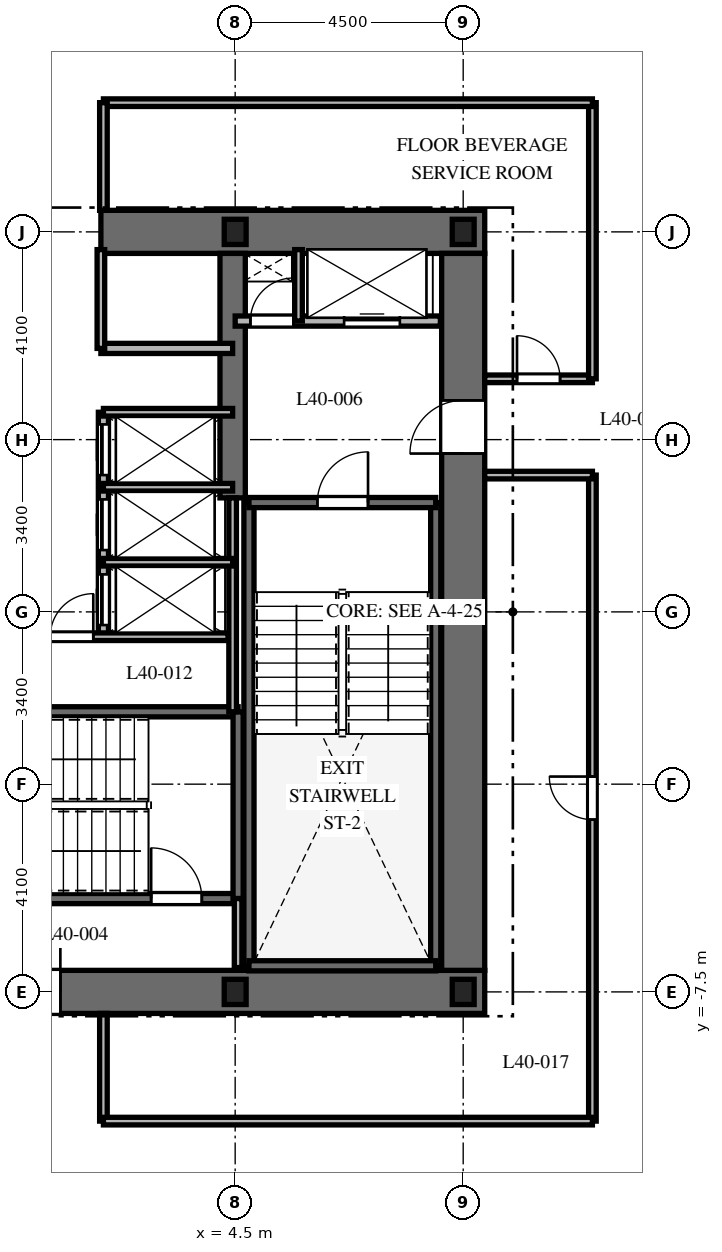
"""IFC4 building model, lengths in metres.
Left out: names, types, materials, properties, quantities, classifications, styles, units other than length and angle.
Written with IfcOpenShell. Run it as: python <this file> out.ifc"""

import sys

from ifc_helpers import new_model, si_unit, direction, frame, frame_2d, origin, origin_2d, place, context, subcontext, project, spatial, rectangle, i_section, extrude, element, fill, save


model = new_model("IFC4")
c1 = context("Model", 3, precision=1e-05, world=origin(), true_north=direction((0.0, 1.0)))
c2 = subcontext(c1, "Body", "Model", "MODEL_VIEW")
j1 = project(units=[si_unit("LENGTHUNIT", "METRE"), si_unit("PLANEANGLEUNIT", "RADIAN")], contexts=[c1])
p1 = place(None, origin())
s1 = spatial("IfcSite", under=j1, at=p1, CompositionType="ELEMENT")
p2 = place(p1, origin())
s2 = spatial("IfcBuilding", under=s1, at=p2, CompositionType="ELEMENT")
p3 = place(p2, frame((0.0, 0.0, 162.8)))
s3 = spatial("IfcBuildingStorey", under=s2, at=p3, CompositionType="ELEMENT", Elevation=162.8)
p4 = place(p3, frame((-9.425, -7.5, 0.0), z_axis=(0.0, 0.0, 1.0), x_axis=(1.0, 0.0, 0.0)))
e1 = element("IfcWall", 1, at=p4, inside=s3, PredefinedType="SHEAR", context=c2, shape_type="SweptSolid", body=[
    extrude(rectangle(XDim=18.85, YDim=0.85, at=frame_2d((9.425, 0.0))), origin(), (0.0, 0.0, 1.0), 3.7),
])
p5 = place(p4, frame((9.475, 0.0, 0.0)))
e2 = element("IfcOpeningElement", 2, at=p5, cuts=e1, PredefinedType="OPENING", context=c2, shape_type="SweptSolid", body=[
    extrude(rectangle(XDim=1.0, YDim=2.15, at=frame_2d((0.5, 1.075))), frame((0.0, 0.435, 0.0), z_axis=(0.0, -1.0, 0.0), x_axis=(1.0, 0.0, 0.0)), (0.0, 0.0, 1.0), 0.87),
])
p6 = place(p3, frame((1.85, 7.5, 0.0), z_axis=(0.0, 0.0, 1.0), x_axis=(1.0, 0.0, 0.0)))
e3 = element("IfcWall", 3, at=p6, inside=s3, PredefinedType="SHEAR", context=c2, shape_type="SweptSolid", body=[
    extrude(rectangle(XDim=7.575, YDim=0.85, at=frame_2d((3.788, 0.0))), origin(), (0.0, 0.0, 1.0), 3.7),
])
p7 = place(p3, frame((9.0, -7.075, 0.0), z_axis=(0.0, 0.0, 1.0), x_axis=(0.0, 1.0, 0.0)))
e4 = element("IfcWall", 4, at=p7, inside=s3, PredefinedType="SHEAR", context=c2, shape_type="SweptSolid", body=[
    extrude(rectangle(XDim=14.15, YDim=0.85, at=frame_2d((7.075, 0.0))), origin(), (0.0, 0.0, 1.0), 3.7),
])
p8 = place(p7, frame((10.2, 0.0, 0.0)))
e5 = element("IfcOpeningElement", 5, at=p8, cuts=e4, PredefinedType="OPENING", context=c2, shape_type="SweptSolid", body=[
    extrude(rectangle(XDim=1.05, YDim=2.15, at=frame_2d((0.525, 1.075))), frame((0.0, 0.435, 0.0), z_axis=(0.0, -1.0, 0.0), x_axis=(1.0, 0.0, 0.0)), (0.0, 0.0, 1.0), 0.87),
])
p9 = place(p3, frame((4.45, 2.25, 0.0), z_axis=(0.0, 0.0, 1.0), x_axis=(0.0, 1.0, 0.0)))
e6 = element("IfcWall", 6, at=p9, inside=s3, PredefinedType="SHEAR", context=c2, shape_type="SweptSolid", body=[
    extrude(rectangle(XDim=4.825, YDim=0.5, at=frame_2d((2.413, 0.0))), origin(), (0.0, 0.0, 1.0), 3.7),
])
for number, where, z_axis, x_axis in (
    (7, (4.772, -6.985, 0.0), (0.0, 0.0, 1.0), (0.0, 1.0, 0.0)),
    (8, (8.458, -6.985, 0.0), (0.0, 0.0, 1.0), (0.0, 1.0, 0.0)),
):
    element("IfcWall", number, at=place(p3, frame(where, z_axis=z_axis, x_axis=x_axis)), inside=s3, PredefinedType="SHEAR", context=c2, shape_type="SweptSolid", body=[
        extrude(rectangle(XDim=9.143, YDim=0.2, at=frame_2d((4.572, 0.0))), origin(), (0.0, 0.0, 1.0), 3.7),
    ])
p10 = place(p3, frame((4.772, -6.985, 0.0), z_axis=(0.0, 0.0, 1.0), x_axis=(1.0, 0.0, 0.0)))
e9 = element("IfcWall", 9, at=p10, inside=s3, PredefinedType="SHEAR", context=c2, shape_type="SweptSolid", body=[
    extrude(rectangle(XDim=3.686, YDim=0.2, at=frame_2d((1.843, 0.0))), origin(), (0.0, 0.0, 1.0), 3.7),
])
p11 = place(p3, frame((4.772, 2.158, 0.0), z_axis=(0.0, 0.0, 1.0), x_axis=(1.0, 0.0, 0.0)))
e10 = element("IfcWall", 10, at=p11, inside=s3, PredefinedType="SHEAR", context=c2, shape_type="SweptSolid", body=[
    extrude(rectangle(XDim=3.686, YDim=0.2, at=frame_2d((1.843, 0.0))), origin(), (0.0, 0.0, 1.0), 3.7),
])
p12 = place(p11, frame((1.35, 0.0, 0.0)))
e11 = element("IfcOpeningElement", 11, at=p12, cuts=e10, PredefinedType="OPENING", context=c2, shape_type="SweptSolid", body=[
    extrude(rectangle(XDim=1.0, YDim=2.15, at=frame_2d((0.5, 1.075))), frame((0.0, 0.11, 0.0), z_axis=(0.0, -1.0, 0.0), x_axis=(1.0, 0.0, 0.0)), (0.0, 0.0, 1.0), 0.22),
])
p13 = place(p3, frame((-4.608, -5.658, 0.0), z_axis=(0.0, 0.0, 1.0), x_axis=(1.0, 0.0, 0.0)))
e12 = element("IfcWall", 12, at=p13, inside=s3, PredefinedType="SHEAR", context=c2, shape_type="SweptSolid", body=[
    extrude(rectangle(XDim=9.166, YDim=0.2, at=frame_2d((4.583, 0.0))), origin(), (0.0, 0.0, 1.0), 3.7),
])
p14 = place(p13, frame((7.45, 0.0, 0.0)))
e13 = element("IfcOpeningElement", 13, at=p14, cuts=e12, PredefinedType="OPENING", context=c2, shape_type="SweptSolid", body=[
    extrude(rectangle(XDim=1.0, YDim=2.15, at=frame_2d((0.5, 1.075))), frame((0.0, 0.11, 0.0), z_axis=(0.0, -1.0, 0.0), x_axis=(1.0, 0.0, 0.0)), (0.0, 0.0, 1.0), 0.22),
])
p15 = place(p3, frame((-4.608, -1.972, 0.0), z_axis=(0.0, 0.0, 1.0), x_axis=(1.0, 0.0, 0.0)))
e14 = element("IfcWall", 14, at=p15, inside=s3, PredefinedType="SHEAR", context=c2, shape_type="SweptSolid", body=[
    extrude(rectangle(XDim=9.166, YDim=0.2, at=frame_2d((4.583, 0.0))), origin(), (0.0, 0.0, 1.0), 3.7),
])
p16 = place(p3, frame((4.558, -5.658, 0.0), z_axis=(0.0, 0.0, 1.0), x_axis=(0.0, 1.0, 0.0)))
e15 = element("IfcWall", 15, at=p16, inside=s3, PredefinedType="SHEAR", context=c2, shape_type="SweptSolid", body=[
    extrude(rectangle(XDim=3.686, YDim=0.2, at=frame_2d((1.843, 0.0))), origin(), (0.0, 0.0, 1.0), 3.7),
])
for number, where, z_axis, x_axis in (
    (16, (4.5, -7.5, 0.0), (0.0, 0.0, 1.0), (1.0, 0.0, 0.0)),
    (17, (9.0, -7.5, 0.0), (0.0, 0.0, 1.0), (1.0, 0.0, 0.0)),
    (18, (9.0, 7.5, 0.0), (0.0, 0.0, 1.0), (1.0, 0.0, 0.0)),
    (19, (4.5, 7.5, 0.0), (0.0, 0.0, 1.0), (1.0, 0.0, 0.0)),
):
    element("IfcColumn", number, at=place(p3, frame(where, z_axis=z_axis, x_axis=x_axis)), inside=s3, PredefinedType="COLUMN", context=c2, shape_type="SweptSolid", body=[
        extrude(i_section(OverallWidth=0.432, OverallDepth=0.498, WebThickness=0.056, FlangeThickness=0.089, at=origin_2d()), origin(), (0.0, 0.0, 1.0), 3.7),
    ])
p17 = place(p3, frame((4.558, -7.02, 0.0), z_axis=(0.0, 0.0, 1.0), x_axis=(0.0, 1.0, 0.0)))
e20 = element("IfcWall", 20, at=p17, inside=s3, PredefinedType="PARTITIONING", context=c2, shape_type="SweptSolid", body=[
    extrude(rectangle(XDim=1.362, YDim=0.15, at=frame_2d((0.681, 0.0))), origin(), (0.0, 0.0, 1.0), 3.4),
])
p18 = place(p3, frame((4.5, 5.74, 0.0), z_axis=(0.0, 0.0, 1.0), x_axis=(1.0, 0.0, 0.0)))
e21 = element("IfcWall", 21, at=p18, inside=s3, PredefinedType="PARTITIONING", context=c2, shape_type="SweptSolid", body=[
    extrude(rectangle(XDim=4.05, YDim=0.2, at=frame_2d((2.025, 0.0))), origin(), (0.0, 0.0, 1.0), 3.4),
])
p19 = place(p18, frame((0.3, 0.0, 0.0)))
e22 = element("IfcOpeningElement", 22, at=p19, cuts=e21, PredefinedType="OPENING", context=c2, shape_type="SweptSolid", body=[
    extrude(rectangle(XDim=0.85, YDim=2.03, at=frame_2d((0.425, 1.015))), frame((0.0, 0.11, 0.0), z_axis=(0.0, -1.0, 0.0), x_axis=(1.0, 0.0, 0.0)), (0.0, 0.0, 1.0), 0.22),
])
p20 = place(p18, frame((2.15, 0.0, 0.0)))
e23 = element("IfcOpeningElement", 23, at=p20, cuts=e21, PredefinedType="OPENING", context=c2, shape_type="SweptSolid", body=[
    extrude(rectangle(XDim=1.1, YDim=2.2, at=frame_2d((0.55, 1.1))), frame((0.0, 0.11, 0.0), z_axis=(0.0, -1.0, 0.0), x_axis=(1.0, 0.0, 0.0)), (0.0, 0.0, 1.0), 0.22),
])
p21 = place(p3, frame((5.75, 5.74, 0.0), z_axis=(0.0, 0.0, 1.0), x_axis=(0.0, 1.0, 0.0)))
e24 = element("IfcWall", 24, at=p21, inside=s3, PredefinedType="PARTITIONING", context=c2, shape_type="SweptSolid", body=[
    extrude(rectangle(XDim=1.41, YDim=0.15, at=frame_2d((0.705, 0.0))), origin(), (0.0, 0.0, 1.0), 3.4),
])
p22 = place(p3, frame((1.85, 5.2, 0.0), z_axis=(0.0, 0.0, 1.0), x_axis=(1.0, 0.0, 0.0)))
e25 = element("IfcWall", 25, at=p22, inside=s3, PredefinedType="PARTITIONING", context=c2, shape_type="SweptSolid", body=[
    extrude(rectangle(XDim=2.6, YDim=0.2, at=frame_2d((1.3, 0.0))), origin(), (0.0, 0.0, 1.0), 3.4),
])
p23 = place(p3, frame((1.85, 5.2, 0.0), z_axis=(0.0, 0.0, 1.0), x_axis=(0.0, 1.0, 0.0)))
e26 = element("IfcWall", 26, at=p23, inside=s3, PredefinedType="PARTITIONING", context=c2, shape_type="SweptSolid", body=[
    extrude(rectangle(XDim=1.95, YDim=0.15, at=frame_2d((0.975, 0.0))), origin(), (0.0, 0.0, 1.0), 3.4),
])
p24 = place(p3, frame((4.45, -1.972, 0.0), z_axis=(0.0, 0.0, 1.0), x_axis=(0.0, 1.0, 0.0)))
e27 = element("IfcWall", 27, at=p24, inside=s3, PredefinedType="PARTITIONING", context=c2, shape_type="SweptSolid", body=[
    extrude(rectangle(XDim=4.222, YDim=0.15, at=frame_2d((2.111, 0.0))), origin(), (0.0, 0.0, 1.0), 3.4),
])
p25 = place(p3, frame((1.9, -0.5, 0.0), z_axis=(0.0, 0.0, 1.0), x_axis=(0.0, 1.0, 0.0)))
e28 = element("IfcWall", 28, at=p25, inside=s3, PredefinedType="PARTITIONING", context=c2, shape_type="SweptSolid", body=[
    extrude(rectangle(XDim=4.44, YDim=0.2, at=frame_2d((2.22, 0.0))), origin(), (0.0, 0.0, 1.0), 3.4),
])
p26 = place(p25, frame((0.24, 0.0, 0.0)))
e29 = element("IfcOpeningElement", 29, at=p26, cuts=e28, PredefinedType="OPENING", context=c2, shape_type="SweptSolid", body=[
    extrude(rectangle(XDim=1.0, YDim=2.2, at=frame_2d((0.5, 1.1))), frame((0.0, 0.11, 0.0), z_axis=(0.0, -1.0, 0.0), x_axis=(1.0, 0.0, 0.0)), (0.0, 0.0, 1.0), 0.22),
])
p27 = place(p25, frame((1.72, 0.0, 0.0)))
e30 = element("IfcOpeningElement", 30, at=p27, cuts=e28, PredefinedType="OPENING", context=c2, shape_type="SweptSolid", body=[
    extrude(rectangle(XDim=1.0, YDim=2.2, at=frame_2d((0.5, 1.1))), frame((0.0, 0.11, 0.0), z_axis=(0.0, -1.0, 0.0), x_axis=(1.0, 0.0, 0.0)), (0.0, 0.0, 1.0), 0.22),
])
p28 = place(p25, frame((3.2, 0.0, 0.0)))
e31 = element("IfcOpeningElement", 31, at=p28, cuts=e28, PredefinedType="OPENING", context=c2, shape_type="SweptSolid", body=[
    extrude(rectangle(XDim=1.0, YDim=2.2, at=frame_2d((0.5, 1.1))), frame((0.0, 0.11, 0.0), z_axis=(0.0, -1.0, 0.0), x_axis=(1.0, 0.0, 0.0)), (0.0, 0.0, 1.0), 0.22),
])
for number, where, z_axis, x_axis in (
    (32, (1.9, 3.94, 0.0), (0.0, 0.0, 1.0), (1.0, 0.0, 0.0)),
    (33, (1.9, 0.98, 0.0), (0.0, 0.0, 1.0), (1.0, 0.0, 0.0)),
    (34, (1.9, 2.46, 0.0), (0.0, 0.0, 1.0), (1.0, 0.0, 0.0)),
):
    element("IfcWall", number, at=place(p3, frame(where, z_axis=z_axis, x_axis=x_axis)), inside=s3, PredefinedType="PARTITIONING", context=c2, shape_type="SweptSolid", body=[
        extrude(rectangle(XDim=2.55, YDim=0.15, at=frame_2d((1.275, 0.0))), origin(), (0.0, 0.0, 1.0), 3.4),
    ])
p29 = place(p3, frame((-4.36, -0.49, 0.0), z_axis=(0.0, 0.0, 1.0), x_axis=(1.0, 0.0, 0.0)))
e35 = element("IfcWall", 35, at=p29, inside=s3, PredefinedType="PARTITIONING", context=c2, shape_type="SweptSolid", body=[
    extrude(rectangle(XDim=8.72, YDim=0.15, at=frame_2d((4.36, 0.0))), origin(), (0.0, 0.0, 1.0), 3.4),
])
p30 = place(p29, frame((3.16, 0.0, 0.0)))
e36 = element("IfcOpeningElement", 36, at=p30, cuts=e35, PredefinedType="OPENING", context=c2, shape_type="SweptSolid", body=[
    extrude(rectangle(XDim=0.85, YDim=2.03, at=frame_2d((0.425, 1.015))), frame((0.0, 0.085, 0.0), z_axis=(0.0, -1.0, 0.0), x_axis=(1.0, 0.0, 0.0)), (0.0, 0.0, 1.0), 0.17),
])
p31 = place(p29, frame((5.21, 0.0, 0.0)))
e37 = element("IfcOpeningElement", 37, at=p31, cuts=e35, PredefinedType="OPENING", context=c2, shape_type="SweptSolid", body=[
    extrude(rectangle(XDim=0.85, YDim=2.03, at=frame_2d((0.425, 1.015))), frame((0.0, 0.085, 0.0), z_axis=(0.0, -1.0, 0.0), x_axis=(1.0, 0.0, 0.0)), (0.0, 0.0, 1.0), 0.17),
])
p32 = place(p3, frame((11.55, -10.05, 0.0), z_axis=(0.0, 0.0, 1.0), x_axis=(0.0, 1.0, 0.0)))
e38 = element("IfcWall", 38, at=p32, inside=s3, PredefinedType="PARTITIONING", context=c2, shape_type="SweptSolid", body=[
    extrude(rectangle(XDim=12.75, YDim=0.15, at=frame_2d((6.375, 0.0))), origin(), (0.0, 0.0, 1.0), 2.84),
])
p33 = place(p32, frame((5.95, 0.0, 0.0)))
e39 = element("IfcOpeningElement", 39, at=p33, cuts=e38, PredefinedType="OPENING", context=c2, shape_type="SweptSolid", body=[
    extrude(rectangle(XDim=0.85, YDim=2.03, at=frame_2d((0.425, 1.015))), frame((0.0, 0.085, 0.0), z_axis=(0.0, -1.0, 0.0), x_axis=(1.0, 0.0, 0.0)), (0.0, 0.0, 1.0), 0.17),
])
p34 = place(p3, frame((11.55, 2.7, 0.0), z_axis=(0.0, 0.0, 1.0), x_axis=(-1.0, 0.0, 0.0)))
e40 = element("IfcWall", 40, at=p34, inside=s3, PredefinedType="PARTITIONING", context=c2, shape_type="SweptSolid", body=[
    extrude(rectangle(XDim=2.125, YDim=0.15, at=frame_2d((1.062, 0.0))), origin(), (0.0, 0.0, 1.0), 3.4),
])
p35 = place(p3, frame((9.425, 4.6, 0.0), z_axis=(0.0, 0.0, 1.0), x_axis=(1.0, 0.0, 0.0)))
e41 = element("IfcWall", 41, at=p35, inside=s3, PredefinedType="PARTITIONING", context=c2, shape_type="SweptSolid", body=[
    extrude(rectangle(XDim=2.125, YDim=0.15, at=frame_2d((1.062, 0.0))), origin(), (0.0, 0.0, 1.0), 3.4),
])
p36 = place(p35, frame((0.637, 0.0, 0.0)))
e42 = element("IfcOpeningElement", 42, at=p36, cuts=e41, PredefinedType="OPENING", context=c2, shape_type="SweptSolid", body=[
    extrude(rectangle(XDim=0.85, YDim=2.03, at=frame_2d((0.425, 1.015))), frame((0.0, 0.085, 0.0), z_axis=(0.0, -1.0, 0.0), x_axis=(1.0, 0.0, 0.0)), (0.0, 0.0, 1.0), 0.17),
])
p37 = place(p3, frame((11.55, 4.6, 0.0), z_axis=(0.0, 0.0, 1.0), x_axis=(0.0, 1.0, 0.0)))
e43 = element("IfcWall", 43, at=p37, inside=s3, PredefinedType="PARTITIONING", context=c2, shape_type="SweptSolid", body=[
    extrude(rectangle(XDim=5.45, YDim=0.15, at=frame_2d((2.725, 0.0))), origin(), (0.0, 0.0, 1.0), 2.84),
])
p38 = place(p3, frame((11.55, 10.05, 0.0), z_axis=(0.0, 0.0, 1.0), x_axis=(-1.0, 0.0, 0.0)))
e44 = element("IfcWall", 44, at=p38, inside=s3, PredefinedType="PARTITIONING", context=c2, shape_type="SweptSolid", body=[
    extrude(rectangle(XDim=9.65, YDim=0.15, at=frame_2d((4.825, 0.0))), origin(), (0.0, 0.0, 1.0), 2.84),
])
for number, where, z_axis, x_axis in (
    (45, (1.9, 10.05, 0.0), (0.0, 0.0, 1.0), (0.0, -1.0, 0.0)),
    (46, (1.9, -7.925, 0.0), (0.0, 0.0, 1.0), (0.0, -1.0, 0.0)),
):
    element("IfcWall", number, at=place(p3, frame(where, z_axis=z_axis, x_axis=x_axis)), inside=s3, PredefinedType="PARTITIONING", context=c2, shape_type="SweptSolid", body=[
        extrude(rectangle(XDim=2.125, YDim=0.15, at=frame_2d((1.062, 0.0))), origin(), (0.0, 0.0, 1.0), 3.4),
    ])
p39 = place(p3, frame((1.9, -10.05, 0.0), z_axis=(0.0, 0.0, 1.0), x_axis=(1.0, 0.0, 0.0)))
e47 = element("IfcWall", 47, at=p39, inside=s3, PredefinedType="PARTITIONING", context=c2, shape_type="SweptSolid", body=[
    extrude(rectangle(XDim=9.65, YDim=0.15, at=frame_2d((4.825, 0.0))), origin(), (0.0, 0.0, 1.0), 2.84),
])
p40 = place(p12, origin())
e48 = element("IfcDoor", 48, at=p40, inside=s3, OperationType="SINGLE_SWING_RIGHT", PredefinedType="DOOR", context=c2, shape_type="SweptSolid", body=[
    extrude(rectangle(XDim=1.0, YDim=2.15, at=frame_2d((0.5, 1.075))), frame((0.0, 0.025, 0.0), z_axis=(0.0, -1.0, 0.0), x_axis=(1.0, 0.0, 0.0)), (0.0, 0.0, 1.0), 0.05),
])
fill(e11, e48)
p41 = place(p14, origin())
e49 = element("IfcDoor", 49, at=p41, inside=s3, OperationType="SINGLE_SWING_LEFT", PredefinedType="DOOR", context=c2, shape_type="SweptSolid", body=[
    extrude(rectangle(XDim=1.0, YDim=2.15, at=frame_2d((0.5, 1.075))), frame((0.0, 0.025, 0.0), z_axis=(0.0, -1.0, 0.0), x_axis=(1.0, 0.0, 0.0)), (0.0, 0.0, 1.0), 0.05),
])
fill(e13, e49)
p42 = place(p5, origin())
e50 = element("IfcDoor", 50, at=p42, inside=s3, OperationType="SINGLE_SWING_RIGHT", PredefinedType="DOOR", context=c2, shape_type="SweptSolid", body=[
    extrude(rectangle(XDim=1.0, YDim=2.15, at=frame_2d((0.5, 1.075))), frame((0.0, 0.025, 0.0), z_axis=(0.0, -1.0, 0.0), x_axis=(1.0, 0.0, 0.0)), (0.0, 0.0, 1.0), 0.05),
])
fill(e2, e50)
p43 = place(p8, origin())
e51 = element("IfcDoor", 51, at=p43, inside=s3, OperationType="SINGLE_SWING_LEFT", PredefinedType="DOOR", context=c2, shape_type="SweptSolid", body=[
    extrude(rectangle(XDim=1.05, YDim=2.15, at=frame_2d((0.525, 1.075))), frame((0.0, 0.025, 0.0), z_axis=(0.0, -1.0, 0.0), x_axis=(1.0, 0.0, 0.0)), (0.0, 0.0, 1.0), 0.05),
])
fill(e5, e51)
p44 = place(p19, origin())
e52 = element("IfcDoor", 52, at=p44, inside=s3, OperationType="SINGLE_SWING_RIGHT", PredefinedType="DOOR", context=c2, shape_type="SweptSolid", body=[
    extrude(rectangle(XDim=0.85, YDim=2.03, at=frame_2d((0.425, 1.015))), frame((0.0, 0.025, 0.0), z_axis=(0.0, -1.0, 0.0), x_axis=(1.0, 0.0, 0.0)), (0.0, 0.0, 1.0), 0.05),
])
fill(e22, e52)
p45 = place(p20, origin())
e53 = element("IfcDoor", 53, at=p45, inside=s3, OperationType="SLIDING_TO_RIGHT", PredefinedType="DOOR", context=c2, shape_type="SweptSolid", body=[
    extrude(rectangle(XDim=1.1, YDim=2.2, at=frame_2d((0.55, 1.1))), frame((0.0, 0.025, 0.0), z_axis=(0.0, -1.0, 0.0), x_axis=(1.0, 0.0, 0.0)), (0.0, 0.0, 1.0), 0.05),
])
fill(e23, e53)
p46 = place(p26, origin())
e54 = element("IfcDoor", 54, at=p46, inside=s3, OperationType="SLIDING_TO_RIGHT", PredefinedType="DOOR", context=c2, shape_type="SweptSolid", body=[
    extrude(rectangle(XDim=1.0, YDim=2.2, at=frame_2d((0.5, 1.1))), frame((0.0, 0.025, 0.0), z_axis=(0.0, -1.0, 0.0), x_axis=(1.0, 0.0, 0.0)), (0.0, 0.0, 1.0), 0.05),
])
fill(e29, e54)
p47 = place(p27, origin())
e55 = element("IfcDoor", 55, at=p47, inside=s3, OperationType="SLIDING_TO_RIGHT", PredefinedType="DOOR", context=c2, shape_type="SweptSolid", body=[
    extrude(rectangle(XDim=1.0, YDim=2.2, at=frame_2d((0.5, 1.1))), frame((0.0, 0.025, 0.0), z_axis=(0.0, -1.0, 0.0), x_axis=(1.0, 0.0, 0.0)), (0.0, 0.0, 1.0), 0.05),
])
fill(e30, e55)
p48 = place(p28, origin())
e56 = element("IfcDoor", 56, at=p48, inside=s3, OperationType="SLIDING_TO_RIGHT", PredefinedType="DOOR", context=c2, shape_type="SweptSolid", body=[
    extrude(rectangle(XDim=1.0, YDim=2.2, at=frame_2d((0.5, 1.1))), frame((0.0, 0.025, 0.0), z_axis=(0.0, -1.0, 0.0), x_axis=(1.0, 0.0, 0.0)), (0.0, 0.0, 1.0), 0.05),
])
fill(e31, e56)
p49 = place(p31, origin())
e57 = element("IfcDoor", 57, at=p49, inside=s3, OperationType="SINGLE_SWING_RIGHT", PredefinedType="DOOR", context=c2, shape_type="SweptSolid", body=[
    extrude(rectangle(XDim=0.85, YDim=2.03, at=frame_2d((0.425, 1.015))), frame((0.0, 0.025, 0.0), z_axis=(0.0, -1.0, 0.0), x_axis=(1.0, 0.0, 0.0)), (0.0, 0.0, 1.0), 0.05),
])
fill(e37, e57)
p50 = place(p36, origin())
e58 = element("IfcDoor", 58, at=p50, inside=s3, OperationType="SINGLE_SWING_LEFT", PredefinedType="DOOR", context=c2, shape_type="SweptSolid", body=[
    extrude(rectangle(XDim=0.85, YDim=2.03, at=frame_2d((0.425, 1.015))), frame((0.0, 0.025, 0.0), z_axis=(0.0, -1.0, 0.0), x_axis=(1.0, 0.0, 0.0)), (0.0, 0.0, 1.0), 0.05),
])
fill(e42, e58)
p51 = place(p33, origin())
e59 = element("IfcDoor", 59, at=p51, inside=s3, OperationType="SINGLE_SWING_RIGHT", PredefinedType="DOOR", context=c2, shape_type="SweptSolid", body=[
    extrude(rectangle(XDim=0.85, YDim=2.03, at=frame_2d((0.425, 1.015))), frame((0.0, 0.025, 0.0), z_axis=(0.0, -1.0, 0.0), x_axis=(1.0, 0.0, 0.0)), (0.0, 0.0, 1.0), 0.05),
])
fill(e39, e59)
save(model, sys.argv[1])
